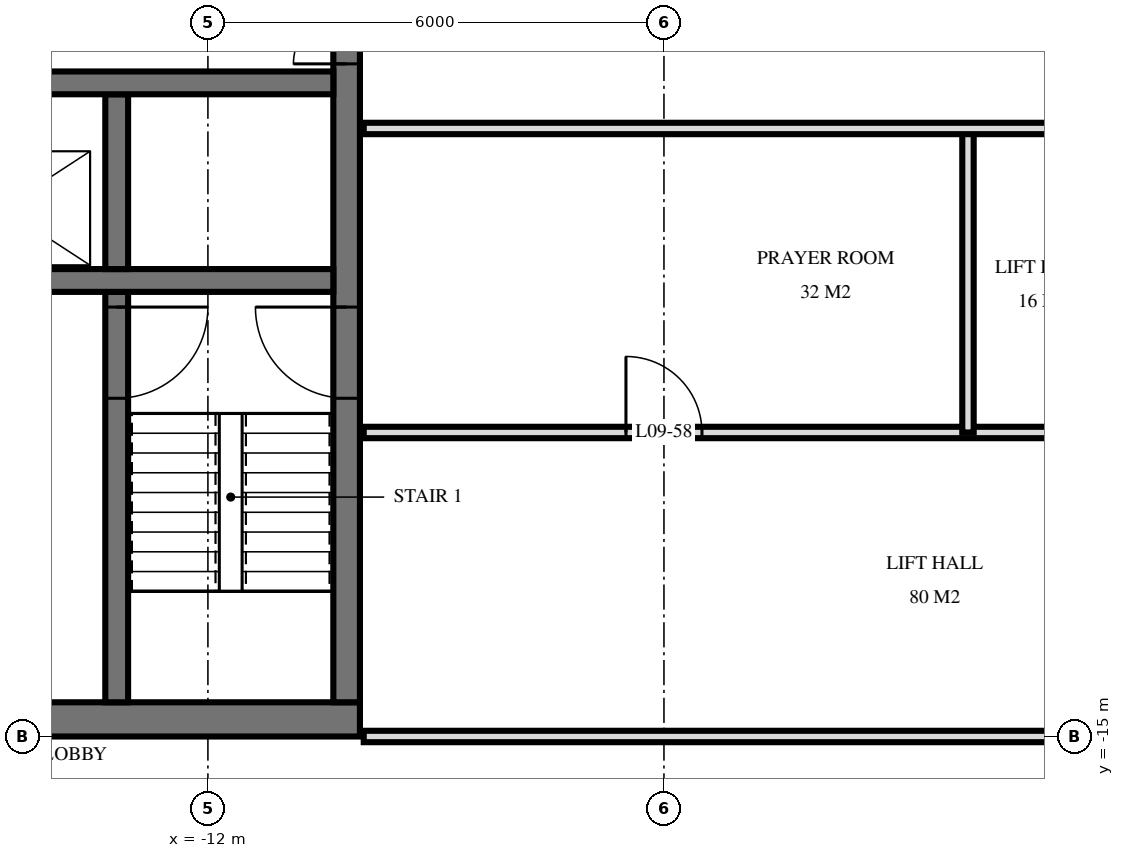
"""IFC4 building model, lengths in metres.
Left out: names, types, materials, properties, quantities, classifications, styles, units other than length and angle.
Written with IfcOpenShell. Run it as: python <this file> out.ifc"""

import sys

from ifc_helpers import new_model, si_unit, direction, frame, frame_2d, origin, place, context, subcontext, project, spatial, rectangle, extrude, element, fill, save


model = new_model("IFC4")
c1 = context("Model", 3, precision=1e-05, world=origin(), true_north=direction((0.0, 1.0)))
c2 = subcontext(c1, "Body", "Model", "MODEL_VIEW")
j1 = project(units=[si_unit("LENGTHUNIT", "METRE"), si_unit("PLANEANGLEUNIT", "RADIAN")], contexts=[c1])
p1 = place(None, origin())
s1 = spatial("IfcSite", under=j1, at=p1, CompositionType="ELEMENT")
p2 = place(p1, origin())
s2 = spatial("IfcBuilding", under=s1, at=p2, CompositionType="ELEMENT")
p3 = place(p2, frame((0.0, 0.0, 42.0)))
s3 = spatial("IfcBuildingStorey", under=s2, at=p3, CompositionType="ELEMENT", Elevation=42.0)
p4 = place(p3, frame((-29.5, -14.775, 0.0), z_axis=(0.0, 0.0, 1.0), x_axis=(1.0, 0.0, 0.0)))
e1 = element("IfcWall", 1, at=p4, inside=s3, PredefinedType="SHEAR", context=c2, shape_type="SweptSolid", body=[
    extrude(rectangle(XDim=19.5, YDim=0.45, at=frame_2d((9.75, 0.0))), origin(), (0.0, 0.0, 1.0), 3.6),
])
p5 = place(p4, frame((11.2, 0.0, 0.0)))
e2 = element("IfcOpeningElement", 2, at=p5, cuts=e1, PredefinedType="OPENING", context=c2, shape_type="SweptSolid", body=[
    extrude(rectangle(XDim=1.2, YDim=2.1, at=frame_2d((0.6, 1.05))), frame((0.0, 0.235, 0.0), z_axis=(0.0, -1.0, 0.0), x_axis=(1.0, 0.0, 0.0)), (0.0, 0.0, 1.0), 0.47),
])
p6 = place(p4, frame((14.25, 0.0, 0.0)))
e3 = element("IfcOpeningElement", 3, at=p6, cuts=e1, PredefinedType="OPENING", context=c2, shape_type="SweptSolid", body=[
    extrude(rectangle(XDim=1.1, YDim=2.1, at=frame_2d((0.55, 1.05))), frame((0.0, 0.235, 0.0), z_axis=(0.0, -1.0, 0.0), x_axis=(1.0, 0.0, 0.0)), (0.0, 0.0, 1.0), 0.47),
])
p7 = place(p4, frame((8.5, 0.0, 0.0)))
e4 = element("IfcOpeningElement", 4, at=p7, cuts=e1, PredefinedType="OPENING", context=c2, shape_type="SweptSolid", body=[
    extrude(rectangle(XDim=0.9, YDim=2.1, at=frame_2d((0.45, 1.05))), frame((0.0, 0.235, 0.0), z_axis=(0.0, -1.0, 0.0), x_axis=(1.0, 0.0, 0.0)), (0.0, 0.0, 1.0), 0.47),
])
p8 = place(p4, frame((6.05, 0.0, 0.0)))
e5 = element("IfcOpeningElement", 5, at=p8, cuts=e1, PredefinedType="OPENING", context=c2, shape_type="SweptSolid", body=[
    extrude(rectangle(XDim=1.0, YDim=2.1, at=frame_2d((0.5, 1.05))), frame((0.0, 0.235, 0.0), z_axis=(0.0, -1.0, 0.0), x_axis=(1.0, 0.0, 0.0)), (0.0, 0.0, 1.0), 0.47),
])
p9 = place(p4, frame((3.587, 0.0, 0.0)))
e6 = element("IfcOpeningElement", 6, at=p9, cuts=e1, PredefinedType="OPENING", context=c2, shape_type="SweptSolid", body=[
    extrude(rectangle(XDim=1.0, YDim=2.1, at=frame_2d((0.5, 1.05))), frame((0.0, 0.235, 0.0), z_axis=(0.0, -1.0, 0.0), x_axis=(1.0, 0.0, 0.0)), (0.0, 0.0, 1.0), 0.47),
])
p10 = place(p4, frame((1.85, 0.0, 0.0)))
e7 = element("IfcOpeningElement", 7, at=p10, cuts=e1, PredefinedType="OPENING", context=c2, shape_type="SweptSolid", body=[
    extrude(rectangle(XDim=1.0, YDim=2.1, at=frame_2d((0.5, 1.05))), frame((0.0, 0.235, 0.0), z_axis=(0.0, -1.0, 0.0), x_axis=(1.0, 0.0, 0.0)), (0.0, 0.0, 1.0), 0.47),
])
p11 = place(p4, frame((0.55, 0.0, 0.0)))
e8 = element("IfcOpeningElement", 8, at=p11, cuts=e1, PredefinedType="OPENING", context=c2, shape_type="SweptSolid", body=[
    extrude(rectangle(XDim=1.0, YDim=2.1, at=frame_2d((0.5, 1.05))), frame((0.0, 0.235, 0.0), z_axis=(0.0, -1.0, 0.0), x_axis=(1.0, 0.0, 0.0)), (0.0, 0.0, 1.0), 0.47),
])
p12 = place(p3, frame((-10.175, -14.55, 0.0), z_axis=(0.0, 0.0, 1.0), x_axis=(0.0, 1.0, 0.0)))
e9 = element("IfcWall", 9, at=p12, inside=s3, PredefinedType="SHEAR", context=c2, shape_type="SweptSolid", body=[
    extrude(rectangle(XDim=14.1, YDim=0.35, at=frame_2d((7.05, 0.0))), origin(), (0.0, 0.0, 1.0), 3.6),
])
p13 = place(p12, frame((8.4, 0.0, 0.0)))
e10 = element("IfcOpeningElement", 10, at=p13, cuts=e9, PredefinedType="OPENING", context=c2, shape_type="SweptSolid", body=[
    extrude(rectangle(XDim=1.4, YDim=2.4, at=frame_2d((0.7, 1.2))), frame((0.0, 0.185, 0.0), z_axis=(0.0, -1.0, 0.0), x_axis=(1.0, 0.0, 0.0)), (0.0, 0.0, 1.0), 0.37),
])
p14 = place(p12, frame((10.0, 0.0, 0.0)))
e11 = element("IfcOpeningElement", 11, at=p14, cuts=e9, PredefinedType="OPENING", context=c2, shape_type="SweptSolid", body=[
    extrude(rectangle(XDim=1.4, YDim=2.4, at=frame_2d((0.7, 1.2))), frame((0.0, 0.185, 0.0), z_axis=(0.0, -1.0, 0.0), x_axis=(1.0, 0.0, 0.0)), (0.0, 0.0, 1.0), 0.37),
])
p15 = place(p12, frame((4.0, 0.0, 0.0)))
e12 = element("IfcOpeningElement", 12, at=p15, cuts=e9, PredefinedType="OPENING", context=c2, shape_type="SweptSolid", body=[
    extrude(rectangle(XDim=1.2, YDim=2.1, at=frame_2d((0.6, 1.05))), frame((0.0, 0.185, 0.0), z_axis=(0.0, -1.0, 0.0), x_axis=(1.0, 0.0, 0.0)), (0.0, 0.0, 1.0), 0.37),
])
p16 = place(p3, frame((-29.05, -6.4, 0.0), z_axis=(0.0, 0.0, 1.0), x_axis=(1.0, 0.0, 0.0)))
e13 = element("IfcWall", 13, at=p16, inside=s3, PredefinedType="SHEAR", context=c2, shape_type="SweptSolid", body=[
    extrude(rectangle(XDim=18.7, YDim=0.3, at=frame_2d((9.35, 0.0))), origin(), (0.0, 0.0, 1.0), 3.6),
])
p17 = place(p16, frame((2.95, 0.0, 0.0)))
e14 = element("IfcOpeningElement", 14, at=p17, cuts=e13, PredefinedType="OPENING", context=c2, shape_type="SweptSolid", body=[
    extrude(rectangle(XDim=1.1, YDim=2.1, at=frame_2d((0.55, 1.05))), frame((0.0, 0.16, 0.0), z_axis=(0.0, -1.0, 0.0), x_axis=(1.0, 0.0, 0.0)), (0.0, 0.0, 1.0), 0.32),
])
p18 = place(p16, frame((0.55, 0.0, 0.0)))
e15 = element("IfcOpeningElement", 15, at=p18, cuts=e13, PredefinedType="OPENING", context=c2, shape_type="SweptSolid", body=[
    extrude(rectangle(XDim=1.1, YDim=2.1, at=frame_2d((0.55, 1.05))), frame((0.0, 0.16, 0.0), z_axis=(0.0, -1.0, 0.0), x_axis=(1.0, 0.0, 0.0)), (0.0, 0.0, 1.0), 0.32),
])
p19 = place(p16, frame((10.8, 0.0, 0.0)))
e16 = element("IfcOpeningElement", 16, at=p19, cuts=e13, PredefinedType="OPENING", context=c2, shape_type="SweptSolid", body=[
    extrude(rectangle(XDim=1.1, YDim=2.1, at=frame_2d((0.55, 1.05))), frame((0.0, 0.16, 0.0), z_axis=(0.0, -1.0, 0.0), x_axis=(1.0, 0.0, 0.0)), (0.0, 0.0, 1.0), 0.32),
])
p20 = place(p16, frame((5.6, 0.0, 0.0)))
e17 = element("IfcOpeningElement", 17, at=p20, cuts=e13, PredefinedType="OPENING", context=c2, shape_type="SweptSolid", body=[
    extrude(rectangle(XDim=1.0, YDim=2.1, at=frame_2d((0.5, 1.05))), frame((0.0, 0.16, 0.0), z_axis=(0.0, -1.0, 0.0), x_axis=(1.0, 0.0, 0.0)), (0.0, 0.0, 1.0), 0.32),
])
p21 = place(p3, frame((-29.05, -9.0, 0.0), z_axis=(0.0, 0.0, 1.0), x_axis=(1.0, 0.0, 0.0)))
e18 = element("IfcWall", 18, at=p21, inside=s3, PredefinedType="SHEAR", context=c2, shape_type="SweptSolid", body=[
    extrude(rectangle(XDim=18.7, YDim=0.3, at=frame_2d((9.35, 0.0))), origin(), (0.0, 0.0, 1.0), 3.6),
])
p22 = place(p21, frame((13.8, 0.0, 0.0)))
e19 = element("IfcOpeningElement", 19, at=p22, cuts=e18, PredefinedType="OPENING", context=c2, shape_type="SweptSolid", body=[
    extrude(rectangle(XDim=1.1, YDim=2.1, at=frame_2d((0.55, 1.05))), frame((0.0, 0.16, 0.0), z_axis=(0.0, -1.0, 0.0), x_axis=(1.0, 0.0, 0.0)), (0.0, 0.0, 1.0), 0.32),
])
p23 = place(p3, frame((-13.2, -8.85, 0.0), z_axis=(0.0, 0.0, 1.0), x_axis=(0.0, 1.0, 0.0)))
e20 = element("IfcWall", 20, at=p23, inside=s3, PredefinedType="SHEAR", context=c2, shape_type="SweptSolid", body=[
    extrude(rectangle(XDim=2.3, YDim=0.3, at=frame_2d((1.15, 0.0))), origin(), (0.0, 0.0, 1.0), 3.6),
])
p24 = place(p3, frame((-13.2, -14.55, 0.0), z_axis=(0.0, 0.0, 1.0), x_axis=(0.0, 1.0, 0.0)))
e21 = element("IfcWall", 21, at=p24, inside=s3, PredefinedType="SHEAR", context=c2, shape_type="SweptSolid", body=[
    extrude(rectangle(XDim=5.4, YDim=0.3, at=frame_2d((2.7, 0.0))), origin(), (0.0, 0.0, 1.0), 3.6),
])
p25 = place(p24, frame((4.0, 0.0, 0.0)))
e22 = element("IfcOpeningElement", 22, at=p25, cuts=e21, PredefinedType="OPENING", context=c2, shape_type="SweptSolid", body=[
    extrude(rectangle(XDim=1.2, YDim=2.1, at=frame_2d((0.6, 1.05))), frame((0.0, 0.16, 0.0), z_axis=(0.0, -1.0, 0.0), x_axis=(1.0, 0.0, 0.0)), (0.0, 0.0, 1.0), 0.32),
])
p26 = place(p3, frame((-2.0, -11.0, 0.0), z_axis=(0.0, 0.0, 1.0), x_axis=(0.0, 1.0, 0.0)))
e23 = element("IfcWall", 23, at=p26, inside=s3, PredefinedType="PARTITIONING", context=c2, shape_type="SweptSolid", body=[
    extrude(rectangle(XDim=4.0, YDim=0.15, at=frame_2d((2.0, 0.0))), origin(), (0.0, 0.0, 1.0), 3.32),
])
p27 = place(p3, frame((-9.95, -15.0, 0.0), z_axis=(0.0, 0.0, 1.0), x_axis=(1.0, 0.0, 0.0)))
e24 = element("IfcWall", 24, at=p27, inside=s3, PredefinedType="PARTITIONING", context=c2, shape_type="SweptSolid", body=[
    extrude(rectangle(XDim=19.9, YDim=0.15, at=frame_2d((9.95, 0.0))), origin(), (0.0, 0.0, 1.0), 2.684),
])
p28 = place(p27, frame((9.45, 0.0, 0.0)))
e25 = element("IfcOpeningElement", 25, at=p28, cuts=e24, PredefinedType="OPENING", context=c2, shape_type="SweptSolid", body=[
    extrude(rectangle(XDim=1.0, YDim=2.1, at=frame_2d((0.5, 1.05))), frame((0.0, 0.085, 0.0), z_axis=(0.0, -1.0, 0.0), x_axis=(1.0, 0.0, 0.0)), (0.0, 0.0, 1.0), 0.17),
])
p29 = place(p3, frame((-9.95, -11.0, 0.0), z_axis=(0.0, 0.0, 1.0), x_axis=(1.0, 0.0, 0.0)))
e26 = element("IfcWall", 26, at=p29, inside=s3, PredefinedType="PARTITIONING", context=c2, shape_type="SweptSolid", body=[
    extrude(rectangle(XDim=19.9, YDim=0.15, at=frame_2d((9.95, 0.0))), origin(), (0.0, 0.0, 1.0), 3.32),
])
p30 = place(p29, frame((9.45, 0.0, 0.0)))
e27 = element("IfcOpeningElement", 27, at=p30, cuts=e26, PredefinedType="OPENING", context=c2, shape_type="SweptSolid", body=[
    extrude(rectangle(XDim=1.0, YDim=2.1, at=frame_2d((0.5, 1.05))), frame((0.0, 0.085, 0.0), z_axis=(0.0, -1.0, 0.0), x_axis=(1.0, 0.0, 0.0)), (0.0, 0.0, 1.0), 0.17),
])
p31 = place(p29, frame((3.45, 0.0, 0.0)))
e28 = element("IfcOpeningElement", 28, at=p31, cuts=e26, PredefinedType="OPENING", context=c2, shape_type="SweptSolid", body=[
    extrude(rectangle(XDim=1.0, YDim=2.1, at=frame_2d((0.5, 1.05))), frame((0.0, 0.085, 0.0), z_axis=(0.0, -1.0, 0.0), x_axis=(1.0, 0.0, 0.0)), (0.0, 0.0, 1.0), 0.17),
])
p32 = place(p3, frame((-9.95, -7.0, 0.0), z_axis=(0.0, 0.0, 1.0), x_axis=(1.0, 0.0, 0.0)))
e29 = element("IfcWall", 29, at=p32, inside=s3, PredefinedType="PARTITIONING", context=c2, shape_type="SweptSolid", body=[
    extrude(rectangle(XDim=19.9, YDim=0.15, at=frame_2d((9.95, 0.0))), origin(), (0.0, 0.0, 1.0), 3.32),
])
p33 = place(p32, frame((9.45, 0.0, 0.0)))
e30 = element("IfcOpeningElement", 30, at=p33, cuts=e29, PredefinedType="OPENING", context=c2, shape_type="SweptSolid", body=[
    extrude(rectangle(XDim=1.0, YDim=2.1, at=frame_2d((0.5, 1.05))), frame((0.0, 0.085, 0.0), z_axis=(0.0, -1.0, 0.0), x_axis=(1.0, 0.0, 0.0)), (0.0, 0.0, 1.0), 0.17),
])
p34 = place(p32, frame((15.45, 0.0, 0.0)))
e31 = element("IfcOpeningElement", 31, at=p34, cuts=e29, PredefinedType="OPENING", context=c2, shape_type="SweptSolid", body=[
    extrude(rectangle(XDim=1.0, YDim=2.1, at=frame_2d((0.5, 1.05))), frame((0.0, 0.085, 0.0), z_axis=(0.0, -1.0, 0.0), x_axis=(1.0, 0.0, 0.0)), (0.0, 0.0, 1.0), 0.17),
])
p35 = place(p13, origin())
e32 = element("IfcDoor", 32, at=p35, inside=s3, OperationType="DOUBLE_DOOR_SINGLE_SWING", PredefinedType="DOOR", context=c2, shape_type="SweptSolid", body=[
    extrude(rectangle(XDim=1.4, YDim=2.4, at=frame_2d((0.7, 1.2))), frame((0.0, 0.025, 0.0), z_axis=(0.0, -1.0, 0.0), x_axis=(1.0, 0.0, 0.0)), (0.0, 0.0, 1.0), 0.05),
])
fill(e10, e32)
p36 = place(p15, origin())
e33 = element("IfcDoor", 33, at=p36, inside=s3, OperationType="SINGLE_SWING_LEFT", PredefinedType="DOOR", context=c2, shape_type="SweptSolid", body=[
    extrude(rectangle(XDim=1.2, YDim=2.1, at=frame_2d((0.6, 1.05))), frame((0.0, 0.025, 0.0), z_axis=(0.0, -1.0, 0.0), x_axis=(1.0, 0.0, 0.0)), (0.0, 0.0, 1.0), 0.05),
])
fill(e12, e33)
p37 = place(p25, frame((0.6, 0.0, 0.0), z_axis=(0.0, 0.0, 1.0), x_axis=(-1.0, 0.0, 0.0)))
e34 = element("IfcDoor", 34, at=p37, inside=s3, OperationType="SINGLE_SWING_RIGHT", PredefinedType="DOOR", context=c2, shape_type="SweptSolid", body=[
    extrude(rectangle(XDim=1.2, YDim=2.1, at=frame_2d((0.0, 1.05))), frame((0.0, -0.025, 0.0), z_axis=(0.0, 1.0, 0.0), x_axis=(-1.0, 0.0, 0.0)), (0.0, 0.0, 1.0), 0.05),
])
fill(e22, e34)
p38 = place(p31, origin())
e35 = element("IfcDoor", 35, at=p38, inside=s3, OperationType="SINGLE_SWING_RIGHT", PredefinedType="DOOR", context=c2, shape_type="SweptSolid", body=[
    extrude(rectangle(XDim=1.0, YDim=2.1, at=frame_2d((0.5, 1.05))), frame((0.0, 0.025, 0.0), z_axis=(0.0, -1.0, 0.0), x_axis=(1.0, 0.0, 0.0)), (0.0, 0.0, 1.0), 0.05),
])
fill(e28, e35)
save(model, sys.argv[1])
